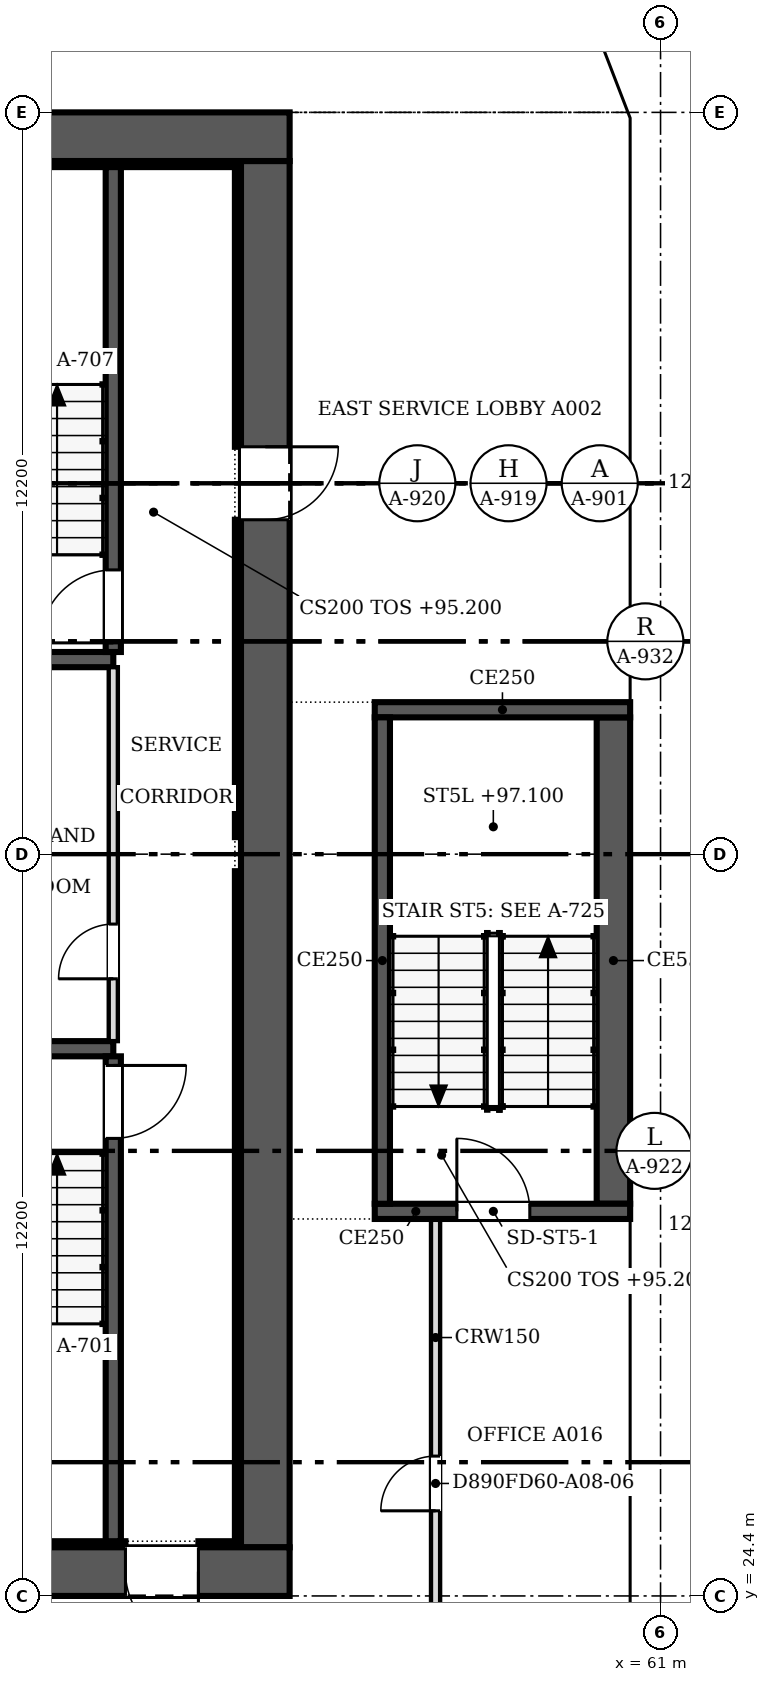
"""IFC4 building model, lengths in metres.
Left out: names, types, materials, properties, quantities, classifications, styles, units other than length and angle.
Written with IfcOpenShell. Run it as: python <this file> out.ifc"""

import sys

from ifc_helpers import new_model, si_unit, direction, frame, frame_2d, origin, place, context, subcontext, project, spatial, polyline, rectangle, outline, extrude, faceted_brep, source, transform, mapped, element, fill, save


model = new_model("IFC4")
c1 = context("Model", 3, precision=1e-05, world=origin(), true_north=direction((0.0, 1.0)))
c2 = subcontext(c1, "Body", "Model", "MODEL_VIEW")
j1 = project(units=[si_unit("LENGTHUNIT", "METRE"), si_unit("PLANEANGLEUNIT", "RADIAN")], contexts=[c1])
p1 = place(None, origin())
s1 = spatial("IfcSite", under=j1, at=p1, CompositionType="ELEMENT")
p2 = place(p1, origin())
s2 = spatial("IfcBuilding", under=s1, at=p2, CompositionType="ELEMENT")
p3 = place(p2, frame((0.0, 0.0, 95.2)))
s3 = spatial("IfcBuildingStorey", under=s2, at=p3, CompositionType="ELEMENT", Elevation=95.2)
m1 = source(origin(), c2, "Body", "Brep", [
    faceted_brep([(3.05, -0.25, 0.0), (6.1, -0.25, 3.8), (6.1, -0.25, 3.8), (3.05, -0.25, 7.6), (0.0, -0.25, 3.8), (0.0, 0.25, 3.8), (3.05, 0.25, 7.6), (6.1, 0.25, 3.8), (6.1, 0.25, 3.8), (3.05, 0.25, 0.0)], [[[0, 1, 2, 3, 4]], [[5, 6, 7, 8, 9]], [[9, 8, 1, 0]], [[7, 6, 3, 2]], [[6, 5, 4, 3]], [[5, 9, 0, 4]], [[1, 8, 7, 2]]]),
])
p4 = place(p3, frame((60.75, 21.35, -3.8), z_axis=(0.0, 0.0, 1.0), x_axis=(0.0, 1.0, 0.0)))
e1 = element("IfcWall", 1, at=p4, inside=s3, PredefinedType="SOLIDWALL", context=c2, shape_type="MappedRepresentation", body=[
    mapped(m1, transform((0.0, 0.0, 0.0), scale=1.0)),
])
m2 = source(origin(), c2, "Body", "SweptSolid", [
    extrude(outline(polyline([(3.05, 0.399), (5.78, 3.8), (3.05, 7.201), (0.321, 3.8), (3.05, 0.399)])), frame((0.0, 0.26, 0.0), z_axis=(0.0, -1.0, 0.0), x_axis=(1.0, 0.0, 0.0)), (0.0, 0.0, 1.0), 0.52),
])
p5 = place(p4, origin())
e2 = element("IfcOpeningElement", 2, at=p5, cuts=e1, PredefinedType="OPENING", context=c2, shape_type="MappedRepresentation", body=[
    mapped(m2, transform((0.0, 0.0, 0.0), scale=1.0)),
])
m3 = source(origin(), c2, "Body", "SweptSolid", [
    extrude(outline(polyline([(3.05, 0.0), (6.1, 3.8), (3.05, 7.6), (0.0, 3.8), (3.05, 0.0)])), frame((0.0, 0.25, 0.0), z_axis=(0.0, -1.0, 0.0), x_axis=(1.0, 0.0, 0.0)), (0.0, 0.0, 1.0), 0.5),
])
p6 = place(p3, frame((60.75, 27.45, -3.8), z_axis=(0.0, 0.0, 1.0), x_axis=(0.0, 1.0, 0.0)))
e3 = element("IfcWall", 3, at=p6, inside=s3, PredefinedType="SOLIDWALL", context=c2, shape_type="MappedRepresentation", body=[
    mapped(m3, transform((0.0, 0.0, 0.0), scale=1.0)),
])
p7 = place(p6, origin())
e4 = element("IfcOpeningElement", 4, at=p7, cuts=e3, PredefinedType="OPENING", context=c2, shape_type="MappedRepresentation", body=[
    mapped(m2, transform((0.0, 0.0, 0.0), scale=1.0)),
])
p8 = place(p3, frame((60.75, 33.55, -3.8), z_axis=(0.0, 0.0, 1.0), x_axis=(0.0, 1.0, 0.0)))
e5 = element("IfcWall", 5, at=p8, inside=s3, PredefinedType="SOLIDWALL", context=c2, shape_type="MappedRepresentation", body=[
    mapped(m1, transform((0.0, 0.0, 0.0), scale=1.0)),
])
p9 = place(p8, origin())
e6 = element("IfcOpeningElement", 6, at=p9, cuts=e5, PredefinedType="OPENING", context=c2, shape_type="MappedRepresentation", body=[
    mapped(m2, transform((0.0, 0.0, 0.0), scale=1.0)),
])
p10 = place(p3, frame((60.75, 39.65, -3.8), z_axis=(0.0, 0.0, 1.0), x_axis=(0.0, 1.0, 0.0)))
e7 = element("IfcWall", 7, at=p10, inside=s3, PredefinedType="SOLIDWALL", context=c2, shape_type="MappedRepresentation", body=[
    mapped(m3, transform((0.0, 0.0, 0.0), scale=1.0)),
])
p11 = place(p10, origin())
e8 = element("IfcOpeningElement", 8, at=p11, cuts=e7, PredefinedType="OPENING", context=c2, shape_type="MappedRepresentation", body=[
    mapped(m2, transform((0.0, 0.0, 0.0), scale=1.0)),
])
m4 = source(origin(), c2, "Body", "Brep", [
    faceted_brep([(3.003, -0.25, 0.0), (3.05, -0.25, 0.06), (3.05, -0.25, 7.54), (3.003, -0.25, 7.6), (0.0, -0.25, 3.8), (0.0, 0.25, 3.8), (2.957, 0.25, 7.541), (2.957, 0.25, 0.059), (3.003, 0.0, 0.0), (3.003, 0.0, 7.6)], [[[0, 1, 2, 3, 4]], [[5, 6, 7]], [[1, 0, 8]], [[9, 3, 2]], [[6, 5, 4, 3, 9]], [[5, 7, 8, 0, 4]], [[1, 8, 7, 6, 9, 2]]]),
])
p12 = place(p3, frame((60.75, 45.75, -3.8), z_axis=(0.0, 0.0, 1.0), x_axis=(0.0, 1.0, 0.0)))
e9 = element("IfcWall", 9, at=p12, inside=s3, PredefinedType="SOLIDWALL", context=c2, shape_type="MappedRepresentation", body=[
    mapped(m4, transform((0.0, 0.0, 0.0), scale=1.0)),
])
m5 = source(origin(), c2, "Body", "SweptSolid", [
    extrude(outline(polyline([(2.803, 6.944), (0.319, 3.8), (2.803, 0.656), (2.803, 6.944)])), frame((0.0, 0.26, 0.0), z_axis=(0.0, -1.0, 0.0), x_axis=(1.0, 0.0, 0.0)), (0.0, 0.0, 1.0), 0.52),
])
p13 = place(p12, origin())
e10 = element("IfcOpeningElement", 10, at=p13, cuts=e9, PredefinedType="OPENING", context=c2, shape_type="MappedRepresentation", body=[
    mapped(m5, transform((0.0, 0.0, 0.0), scale=1.0)),
])
m6 = source(origin(), c2, "Body", "Brep", [
    faceted_brep([(0.047, -0.25, 0.0), (2.997, -0.25, 3.8), (0.047, -0.25, 7.6), (0.0, -0.25, 7.541), (0.0, -0.25, 0.059), (0.093, 0.25, 7.54), (2.944, 0.25, 3.868), (2.944, 0.25, 3.732), (0.093, 0.25, 0.06), (2.997, 0.0, 3.8), (0.047, 0.0, 0.0), (0.047, 0.0, 7.6)], [[[0, 1, 2, 3, 4]], [[5, 6, 7, 8]], [[8, 7, 9, 1, 0, 10]], [[6, 5, 11, 2, 1, 9]], [[3, 2, 11]], [[10, 0, 4]], [[8, 10, 4, 3, 11, 5]], [[9, 7, 6]]]),
])
p14 = place(p3, frame((60.767, 48.71, -3.8), z_axis=(0.0, 0.0, 1.0), x_axis=(-0.359901446078, 0.932990326376, 0.0)))
e11 = element("IfcWall", 11, at=p14, inside=s3, PredefinedType="SOLIDWALL", context=c2, shape_type="MappedRepresentation", body=[
    mapped(m6, transform((0.0, 0.0, 0.0), scale=1.0)),
])
m7 = source(origin(), c2, "Body", "SweptSolid", [
    extrude(outline(polyline([(0.247, 0.665), (2.681, 3.8), (0.247, 6.935), (0.247, 0.665)])), frame((0.0, 0.26, 0.0), z_axis=(0.0, -1.0, 0.0), x_axis=(1.0, 0.0, 0.0)), (0.0, 0.0, 1.0), 0.52),
])
p15 = place(p14, origin())
e12 = element("IfcOpeningElement", 12, at=p15, cuts=e11, PredefinedType="OPENING", context=c2, shape_type="MappedRepresentation", body=[
    mapped(m7, transform((0.0, 0.0, 0.0), scale=1.0)),
])
p16 = place(p2, frame((0.0, 0.0, 99.0)))
s4 = spatial("IfcBuildingStorey", under=s2, at=p16, CompositionType="ELEMENT", Elevation=99.0)
p17 = place(p16, frame((60.75, 18.3, -3.8), z_axis=(0.0, 0.0, 1.0), x_axis=(0.0, 1.0, 0.0)))
e13 = element("IfcWall", 13, at=p17, inside=s4, PredefinedType="SOLIDWALL", context=c2, shape_type="MappedRepresentation", body=[
    mapped(m1, transform((0.0, 0.0, 0.0), scale=1.0)),
])
p18 = place(p17, origin())
e14 = element("IfcOpeningElement", 14, at=p18, cuts=e13, PredefinedType="OPENING", context=c2, shape_type="MappedRepresentation", body=[
    mapped(m2, transform((0.0, 0.0, 0.0), scale=1.0)),
])
p19 = place(p16, frame((60.75, 24.4, -3.8), z_axis=(0.0, 0.0, 1.0), x_axis=(0.0, 1.0, 0.0)))
e15 = element("IfcWall", 15, at=p19, inside=s4, PredefinedType="SOLIDWALL", context=c2, shape_type="MappedRepresentation", body=[
    mapped(m3, transform((0.0, 0.0, 0.0), scale=1.0)),
])
p20 = place(p19, origin())
e16 = element("IfcOpeningElement", 16, at=p20, cuts=e15, PredefinedType="OPENING", context=c2, shape_type="MappedRepresentation", body=[
    mapped(m2, transform((0.0, 0.0, 0.0), scale=1.0)),
])
p21 = place(p16, frame((60.75, 30.5, -3.8), z_axis=(0.0, 0.0, 1.0), x_axis=(0.0, 1.0, 0.0)))
e17 = element("IfcWall", 17, at=p21, inside=s4, PredefinedType="SOLIDWALL", context=c2, shape_type="MappedRepresentation", body=[
    mapped(m3, transform((0.0, 0.0, 0.0), scale=1.0)),
])
p22 = place(p21, origin())
e18 = element("IfcOpeningElement", 18, at=p22, cuts=e17, PredefinedType="OPENING", context=c2, shape_type="MappedRepresentation", body=[
    mapped(m2, transform((0.0, 0.0, 0.0), scale=1.0)),
])
p23 = place(p16, frame((60.75, 36.6, -3.8), z_axis=(0.0, 0.0, 1.0), x_axis=(0.0, 1.0, 0.0)))
e19 = element("IfcWall", 19, at=p23, inside=s4, PredefinedType="SOLIDWALL", context=c2, shape_type="MappedRepresentation", body=[
    mapped(m1, transform((0.0, 0.0, 0.0), scale=1.0)),
])
p24 = place(p23, origin())
e20 = element("IfcOpeningElement", 20, at=p24, cuts=e19, PredefinedType="OPENING", context=c2, shape_type="MappedRepresentation", body=[
    mapped(m2, transform((0.0, 0.0, 0.0), scale=1.0)),
])
m8 = source(origin(), c2, "Body", "Brep", [
    faceted_brep([(3.05, -0.25, 0.0), (6.053, -0.25, 3.8), (3.05, -0.25, 7.6), (0.0, -0.25, 3.8), (0.0, 0.25, 3.8), (3.05, 0.25, 7.6), (6.007, 0.25, 3.859), (6.007, 0.25, 3.741), (3.05, 0.25, 0.0), (6.053, 0.0, 3.8)], [[[0, 1, 2, 3]], [[4, 5, 6, 7, 8]], [[8, 7, 9, 1, 0]], [[6, 5, 2, 1, 9]], [[5, 4, 3, 2]], [[4, 8, 0, 3]], [[9, 7, 6]]]),
])
p25 = place(p16, frame((60.75, 42.7, -3.8), z_axis=(0.0, 0.0, 1.0), x_axis=(0.0, 1.0, 0.0)))
e21 = element("IfcWall", 21, at=p25, inside=s4, PredefinedType="SOLIDWALL", context=c2, shape_type="MappedRepresentation", body=[
    mapped(m8, transform((0.0, 0.0, 0.0), scale=1.0)),
])
m9 = source(origin(), c2, "Body", "SweptSolid", [
    extrude(outline(polyline([(3.049, 0.401), (5.735, 3.8), (3.049, 7.199), (0.321, 3.8), (3.049, 0.401)])), frame((0.0, 0.26, 0.0), z_axis=(0.0, -1.0, 0.0), x_axis=(1.0, 0.0, 0.0)), (0.0, 0.0, 1.0), 0.52),
])
p26 = place(p25, origin())
e22 = element("IfcOpeningElement", 22, at=p26, cuts=e21, PredefinedType="OPENING", context=c2, shape_type="MappedRepresentation", body=[
    mapped(m9, transform((0.0, 0.0, 0.0), scale=1.0)),
])
m10 = source(origin(), c2, "Body", "Brep", [
    faceted_brep([(2.95, -0.25, 0.0), (3.003, -0.25, 0.068), (3.003, -0.25, 7.532), (2.95, -0.25, 7.6), (0.0, -0.25, 3.8), (0.047, 0.25, 3.86), (2.898, 0.25, 7.532), (2.898, 0.25, 0.068), (0.047, 0.25, 3.74), (2.95, 0.0, 0.0), (2.95, 0.0, 7.6), (0.0, 0.0, 3.8)], [[[0, 1, 2, 3, 4]], [[5, 6, 7, 8]], [[1, 0, 9]], [[10, 3, 2]], [[6, 5, 11, 4, 3, 10]], [[8, 7, 9, 0, 4, 11]], [[8, 11, 5]], [[1, 9, 7, 6, 10, 2]]]),
])
p27 = place(p16, frame((60.75, 48.753, -3.8), z_axis=(0.0, 0.0, 1.0), x_axis=(-0.35992665181, 0.932980602862, 0.0)))
e23 = element("IfcWall", 23, at=p27, inside=s4, PredefinedType="SOLIDWALL", context=c2, shape_type="MappedRepresentation", body=[
    mapped(m10, transform((0.0, 0.0, 0.0), scale=1.0)),
])
m11 = source(origin(), c2, "Body", "SweptSolid", [
    extrude(outline(polyline([(2.75, 6.935), (0.316, 3.8), (2.75, 0.665), (2.75, 6.935)])), frame((0.0, 0.26, 0.0), z_axis=(0.0, -1.0, 0.0), x_axis=(1.0, 0.0, 0.0)), (0.0, 0.0, 1.0), 0.52),
])
p28 = place(p27, origin())
e24 = element("IfcOpeningElement", 24, at=p28, cuts=e23, PredefinedType="OPENING", context=c2, shape_type="MappedRepresentation", body=[
    mapped(m11, transform((0.0, 0.0, 0.0), scale=1.0)),
])
p29 = place(p3, frame((54.9, 24.8, 0.0), z_axis=(0.0, 0.0, 1.0), x_axis=(-1.0, 0.0, 0.0)))
e25 = element("IfcWall", 25, at=p29, inside=s3, PredefinedType="SHEAR", context=c2, shape_type="SweptSolid", body=[
    extrude(rectangle(XDim=24.4, YDim=0.8, at=frame_2d((12.2, 0.0))), origin(), (0.0, 0.0, 1.0), 3.8),
])
m12 = source(origin(), c2, "Body", "SweptSolid", [
    extrude(rectangle(XDim=1.2, YDim=2.1, at=frame_2d((0.6, 1.05))), frame((0.0, 0.41, 0.0), z_axis=(0.0, -1.0, 0.0), x_axis=(1.0, 0.0, 0.0)), (0.0, 0.0, 1.0), 0.82),
])
p30 = place(p29, frame((1.5, 0.0, 0.0)))
e26 = element("IfcOpeningElement", 26, at=p30, cuts=e25, PredefinedType="OPENING", context=c2, shape_type="MappedRepresentation", body=[
    mapped(m12, transform((0.0, 0.0, 0.0), scale=1.0)),
])
p31 = place(p3, frame((30.5, 48.4, 0.0), z_axis=(0.0, 0.0, 1.0), x_axis=(1.0, 0.0, 0.0)))
e27 = element("IfcWall", 27, at=p31, inside=s3, PredefinedType="SHEAR", context=c2, shape_type="SweptSolid", body=[
    extrude(rectangle(XDim=24.4, YDim=0.8, at=frame_2d((12.2, 0.0))), origin(), (0.0, 0.0, 1.0), 3.8),
])
p32 = place(p3, frame((54.5, 48.0, 0.0), z_axis=(0.0, 0.0, 1.0), x_axis=(0.0, -1.0, 0.0)))
e28 = element("IfcWall", 28, at=p32, inside=s3, PredefinedType="SHEAR", context=c2, shape_type="SweptSolid", body=[
    extrude(rectangle(XDim=22.8, YDim=0.8, at=frame_2d((11.4, 0.0))), origin(), (0.0, 0.0, 1.0), 3.8),
])
p33 = place(p32, frame((4.7, 0.0, 0.0)))
e29 = element("IfcOpeningElement", 29, at=p33, cuts=e28, PredefinedType="OPENING", context=c2, shape_type="MappedRepresentation", body=[
    mapped(m12, transform((0.0, 0.0, 0.0), scale=1.0)),
])
p34 = place(p3, frame((31.3, 25.25, 0.0), z_axis=(0.0, 0.0, 1.0), x_axis=(1.0, 0.0, 0.0)))
e30 = element("IfcWall", 30, at=p34, inside=s3, PredefinedType="SOLIDWALL", context=c2, shape_type="SweptSolid", body=[
    extrude(rectangle(XDim=20.9, YDim=0.1, at=frame_2d((10.45, 0.0))), origin(), (0.0, 0.0, 1.0), 3.8),
])
p35 = place(p3, frame((53.4, 25.25, 0.0), z_axis=(0.0, 0.0, 1.0), x_axis=(1.0, 0.0, 0.0)))
e31 = element("IfcWall", 31, at=p35, inside=s3, PredefinedType="SOLIDWALL", context=c2, shape_type="SweptSolid", body=[
    extrude(rectangle(XDim=0.7, YDim=0.1, at=frame_2d((0.35, 0.0))), origin(), (0.0, 0.0, 1.0), 3.8),
])
p36 = place(p3, frame((31.3, 47.95, 0.0), z_axis=(0.0, 0.0, 1.0), x_axis=(1.0, 0.0, 0.0)))
e32 = element("IfcWall", 32, at=p36, inside=s3, PredefinedType="SOLIDWALL", context=c2, shape_type="SweptSolid", body=[
    extrude(rectangle(XDim=22.8, YDim=0.1, at=frame_2d((11.4, 0.0))), origin(), (0.0, 0.0, 1.0), 3.8),
])
p37 = place(p3, frame((54.05, 25.3, 0.0), z_axis=(0.0, 0.0, 1.0), x_axis=(0.0, 1.0, 0.0)))
e33 = element("IfcWall", 33, at=p37, inside=s3, PredefinedType="SOLIDWALL", context=c2, shape_type="SweptSolid", body=[
    extrude(rectangle(XDim=11.02, YDim=0.1, at=frame_2d((5.51, 0.0))), origin(), (0.0, 0.0, 1.0), 3.8),
])
p38 = place(p3, frame((54.05, 36.88, 0.0), z_axis=(0.0, 0.0, 1.0), x_axis=(0.0, 1.0, 0.0)))
e34 = element("IfcWall", 34, at=p38, inside=s3, PredefinedType="SOLIDWALL", context=c2, shape_type="SweptSolid", body=[
    extrude(rectangle(XDim=5.22, YDim=0.1, at=frame_2d((2.61, 0.0))), origin(), (0.0, 0.0, 1.0), 3.8),
])
p39 = place(p3, frame((54.05, 43.3, 0.0), z_axis=(0.0, 0.0, 1.0), x_axis=(0.0, 1.0, 0.0)))
e35 = element("IfcWall", 35, at=p39, inside=s3, PredefinedType="SOLIDWALL", context=c2, shape_type="SweptSolid", body=[
    extrude(rectangle(XDim=4.6, YDim=0.1, at=frame_2d((2.3, 0.0))), origin(), (0.0, 0.0, 1.0), 3.8),
])
for number, where, z_axis, x_axis in (
    (36, (48.475, 33.4, 0.0), (0.0, 0.0, 1.0), (1.0, 0.0, 0.0)),
    (37, (48.475, 39.8, 0.0), (0.0, 0.0, 1.0), (1.0, 0.0, 0.0)),
):
    element("IfcWall", number, at=place(p3, frame(where, z_axis=z_axis, x_axis=x_axis)), inside=s3, PredefinedType="SOLIDWALL", context=c2, shape_type="SweptSolid", body=[
        extrude(rectangle(XDim=3.525, YDim=0.25, at=frame_2d((1.762, 0.0))), origin(), (0.0, 0.0, 1.0), 3.8),
    ])
p40 = place(p3, frame((52.0, 25.3, 0.0), z_axis=(0.0, 0.0, 1.0), x_axis=(0.0, 1.0, 0.0)))
e38 = element("IfcWall", 38, at=p40, inside=s3, PredefinedType="SOLIDWALL", context=c2, shape_type="SweptSolid", body=[
    extrude(rectangle(XDim=7.975, YDim=0.25, at=frame_2d((3.987, 0.0))), origin(), (0.0, 0.0, 1.0), 3.8),
])
m13 = source(origin(), c2, "Body", "SweptSolid", [
    extrude(rectangle(XDim=1.2, YDim=2.1, at=frame_2d((0.6, 1.05))), frame((0.0, 0.135, 0.0), z_axis=(0.0, -1.0, 0.0), x_axis=(1.0, 0.0, 0.0)), (0.0, 0.0, 1.0), 0.27),
])
p41 = place(p40, frame((6.625, 0.0, 0.0)))
e39 = element("IfcOpeningElement", 39, at=p41, cuts=e38, PredefinedType="OPENING", context=c2, shape_type="MappedRepresentation", body=[
    mapped(m13, transform((0.0, 0.0, 0.0), scale=1.0)),
])
p42 = place(p3, frame((52.0, 39.925, 0.0), z_axis=(0.0, 0.0, 1.0), x_axis=(0.0, 1.0, 0.0)))
e40 = element("IfcWall", 40, at=p42, inside=s3, PredefinedType="SOLIDWALL", context=c2, shape_type="SweptSolid", body=[
    extrude(rectangle(XDim=7.975, YDim=0.25, at=frame_2d((3.987, 0.0))), origin(), (0.0, 0.0, 1.0), 3.8),
])
p43 = place(p42, frame((0.15, 0.0, 0.0)))
e41 = element("IfcOpeningElement", 41, at=p43, cuts=e40, PredefinedType="OPENING", context=c2, shape_type="MappedRepresentation", body=[
    mapped(m13, transform((0.0, 0.0, 0.0), scale=1.0)),
])
p44 = place(p3, frame((52.0, 33.525, 0.0), z_axis=(0.0, 0.0, 1.0), x_axis=(0.0, 1.0, 0.0)))
e42 = element("IfcWall", 42, at=p44, inside=s3, PredefinedType="PARTITIONING", context=c2, shape_type="SweptSolid", body=[
    extrude(rectangle(XDim=6.15, YDim=0.15, at=frame_2d((3.075, 0.0))), origin(), (0.0, 0.0, 1.0), 3.6),
])
m14 = source(origin(), c2, "Body", "SweptSolid", [
    extrude(rectangle(XDim=0.9, YDim=2.1, at=frame_2d((0.45, 1.05))), frame((0.0, 0.085, 0.0), z_axis=(0.0, -1.0, 0.0), x_axis=(1.0, 0.0, 0.0)), (0.0, 0.0, 1.0), 0.17),
])
p45 = place(p44, frame((1.025, 0.0, 0.0)))
e43 = element("IfcOpeningElement", 43, at=p45, cuts=e42, PredefinedType="OPENING", context=c2, shape_type="MappedRepresentation", body=[
    mapped(m14, transform((0.0, 0.0, 0.0), scale=1.0)),
])
p46 = place(p3, frame((60.5, 30.725, 0.0), z_axis=(0.0, 0.0, 1.0), x_axis=(-1.0, 0.0, 0.0)))
e44 = element("IfcWall", 44, at=p46, inside=s3, PredefinedType="SOLIDWALL", context=c2, shape_type="SweptSolid", body=[
    extrude(rectangle(XDim=4.2, YDim=0.25, at=frame_2d((2.1, 0.0))), origin(), (0.0, 0.0, 1.0), 3.8),
])
p47 = place(p46, frame((1.65, 0.0, 0.0)))
e45 = element("IfcOpeningElement", 45, at=p47, cuts=e44, PredefinedType="OPENING", context=c2, shape_type="MappedRepresentation", body=[
    mapped(m13, transform((0.0, 0.0, 0.0), scale=1.0)),
])
p48 = place(p3, frame((56.425, 30.85, 0.0), z_axis=(0.0, 0.0, 1.0), x_axis=(0.0, 1.0, 0.0)))
e46 = element("IfcWall", 46, at=p48, inside=s3, PredefinedType="SOLIDWALL", context=c2, shape_type="SweptSolid", body=[
    extrude(rectangle(XDim=8.0, YDim=0.25, at=frame_2d((4.0, 0.0))), origin(), (0.0, 0.0, 1.0), 3.8),
])
p49 = place(p3, frame((56.3, 38.975, 0.0), z_axis=(0.0, 0.0, 1.0), x_axis=(1.0, 0.0, 0.0)))
e47 = element("IfcWall", 47, at=p49, inside=s3, PredefinedType="SOLIDWALL", context=c2, shape_type="SweptSolid", body=[
    extrude(rectangle(XDim=4.2, YDim=0.25, at=frame_2d((2.1, 0.0))), origin(), (0.0, 0.0, 1.0), 3.8),
])
p50 = place(p3, frame((60.225, 38.85, 0.0), z_axis=(0.0, 0.0, 1.0), x_axis=(0.0, -1.0, 0.0)))
e48 = element("IfcWall", 48, at=p50, inside=s3, PredefinedType="SOLIDWALL", context=c2, shape_type="SweptSolid", body=[
    extrude(rectangle(XDim=8.0, YDim=0.55, at=frame_2d((4.0, 0.0))), origin(), (0.0, 0.0, 1.0), 3.8),
])
p51 = place(p3, frame((57.3, 30.6, 0.0), z_axis=(0.0, 0.0, 1.0), x_axis=(0.0, -1.0, 0.0)))
e49 = element("IfcWall", 49, at=p51, inside=s3, PredefinedType="PARTITIONING", context=c2, shape_type="SweptSolid", body=[
    extrude(rectangle(XDim=8.6, YDim=0.15, at=frame_2d((4.3, 0.0))), origin(), (0.0, 0.0, 1.0), 3.067),
])
p52 = place(p51, frame((3.9, 0.0, 0.0)))
e50 = element("IfcOpeningElement", 50, at=p52, cuts=e49, PredefinedType="OPENING", context=c2, shape_type="MappedRepresentation", body=[
    mapped(m14, transform((0.0, 0.0, 0.0), scale=1.0)),
])
m15 = source(origin(), c2, "Body", "SweptSolid", [
    extrude(rectangle(XDim=1.2, YDim=2.1, at=frame_2d((0.6, 1.05))), frame((0.0, 0.025, 0.0), z_axis=(0.0, -1.0, 0.0), x_axis=(1.0, 0.0, 0.0)), (0.0, 0.0, 1.0), 0.05),
])
p53 = place(p30, origin())
e51 = element("IfcDoor", 51, at=p53, inside=s3, OperationType="SINGLE_SWING_LEFT", PredefinedType="DOOR", context=c2, shape_type="MappedRepresentation", body=[
    mapped(m15, transform((0.0, 0.0, 0.0), scale=1.0)),
])
fill(e26, e51)
p54 = place(p33, origin())
e52 = element("IfcDoor", 52, at=p54, inside=s3, OperationType="SINGLE_SWING_LEFT", PredefinedType="DOOR", context=c2, shape_type="MappedRepresentation", body=[
    mapped(m15, transform((0.0, 0.0, 0.0), scale=1.0)),
])
fill(e29, e52)
p55 = place(p41, origin())
e53 = element("IfcDoor", 53, at=p55, inside=s3, OperationType="SINGLE_SWING_RIGHT", PredefinedType="DOOR", context=c2, shape_type="MappedRepresentation", body=[
    mapped(m15, transform((0.0, 0.0, 0.0), scale=1.0)),
])
fill(e39, e53)
p56 = place(p43, origin())
e54 = element("IfcDoor", 54, at=p56, inside=s3, OperationType="SINGLE_SWING_LEFT", PredefinedType="DOOR", context=c2, shape_type="MappedRepresentation", body=[
    mapped(m15, transform((0.0, 0.0, 0.0), scale=1.0)),
])
fill(e41, e54)
m16 = source(origin(), c2, "Body", "SweptSolid", [
    extrude(rectangle(XDim=0.9, YDim=2.1, at=frame_2d((0.45, 1.05))), frame((0.0, 0.025, 0.0), z_axis=(0.0, -1.0, 0.0), x_axis=(1.0, 0.0, 0.0)), (0.0, 0.0, 1.0), 0.05),
])
p57 = place(p45, origin())
e55 = element("IfcDoor", 55, at=p57, inside=s3, OperationType="SINGLE_SWING_LEFT", PredefinedType="DOOR", context=c2, shape_type="MappedRepresentation", body=[
    mapped(m16, transform((0.0, 0.0, 0.0), scale=1.0)),
])
fill(e43, e55)
p58 = place(p47, origin())
e56 = element("IfcDoor", 56, at=p58, inside=s3, OperationType="SINGLE_SWING_RIGHT", PredefinedType="DOOR", context=c2, shape_type="MappedRepresentation", body=[
    mapped(m15, transform((0.0, 0.0, 0.0), scale=1.0)),
])
fill(e45, e56)
p59 = place(p52, origin())
e57 = element("IfcDoor", 57, at=p59, inside=s3, OperationType="SINGLE_SWING_RIGHT", PredefinedType="DOOR", context=c2, shape_type="MappedRepresentation", body=[
    mapped(m16, transform((0.0, 0.0, 0.0), scale=1.0)),
])
fill(e50, e57)
save(model, sys.argv[1])
